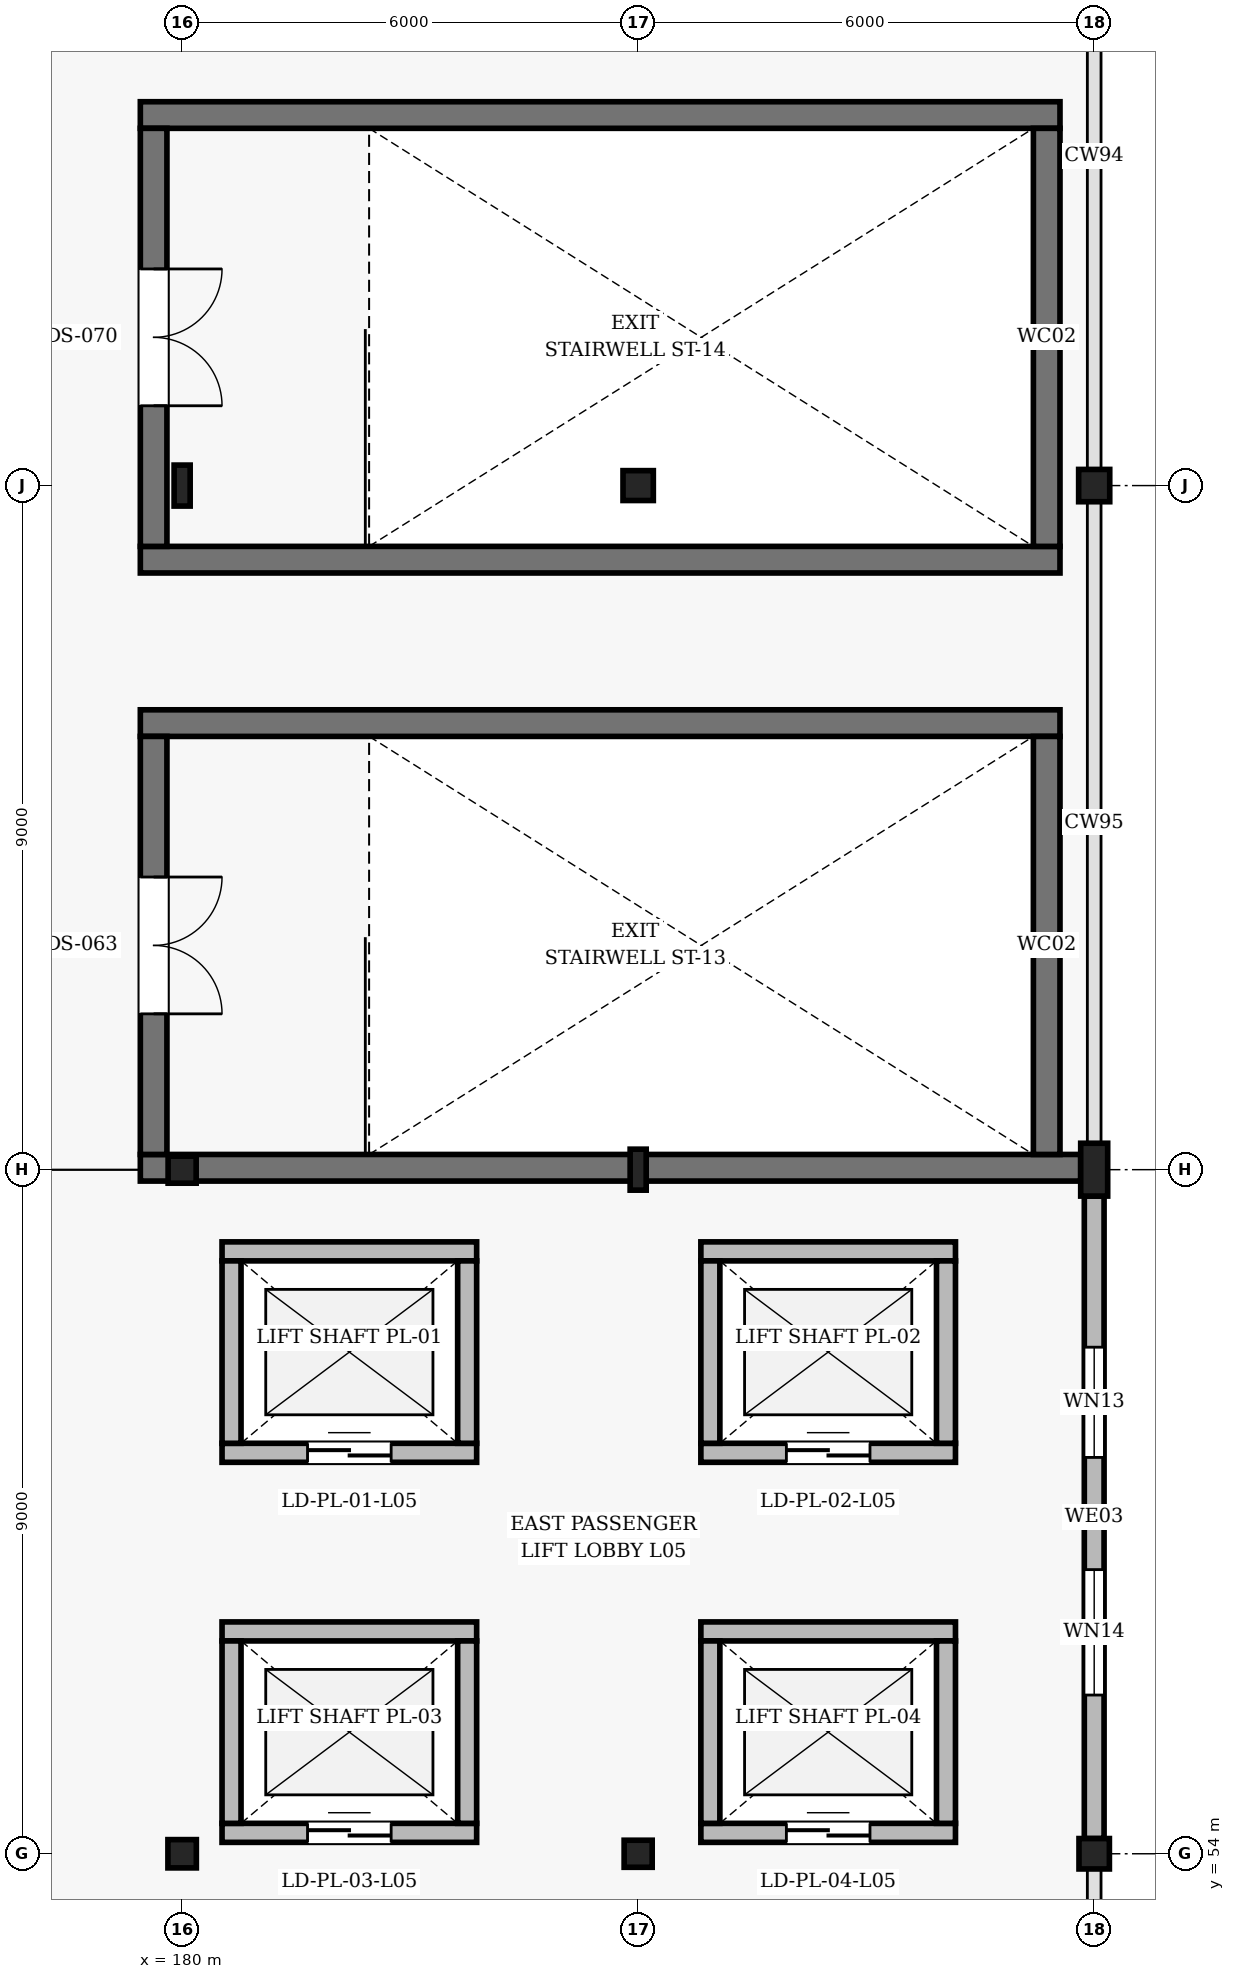
"""IFC4 building model, lengths in metres.
Left out: names, types, materials, properties, quantities, classifications, styles, units other than length and angle.
Written with IfcOpenShell. Run it as: python <this file> out.ifc"""

import sys

from ifc_helpers import new_model, si_unit, direction, frame, frame_2d, origin, origin_2d, place, context, subcontext, project, spatial, rectangle, hollow_rectangle, i_section, extrude, element, fill, save


model = new_model("IFC4")
c1 = context("Model", 3, precision=1e-05, world=origin(), true_north=direction((0.0, 1.0)))
c2 = subcontext(c1, "Body", "Model", "MODEL_VIEW")
j1 = project(units=[si_unit("LENGTHUNIT", "METRE"), si_unit("PLANEANGLEUNIT", "RADIAN")], contexts=[c1])
p1 = place(None, origin())
s1 = spatial("IfcSite", under=j1, at=p1, CompositionType="ELEMENT")
p2 = place(p1, origin())
s2 = spatial("IfcBuilding", under=s1, at=p2, CompositionType="ELEMENT")
p3 = place(p2, frame((0.0, 0.0, 25.2)))
s3 = spatial("IfcBuildingStorey", under=s2, at=p3, CompositionType="ELEMENT", Elevation=25.2)
p4 = place(p3, frame((180.0, 54.0, 0.0), z_axis=(0.0, 0.0, 1.0), x_axis=(1.0, 0.0, 0.0)))
e1 = element("IfcColumn", 1, at=p4, inside=s3, PredefinedType="COLUMN", context=c2, shape_type="SweptSolid", body=[
    extrude(i_section(OverallWidth=0.374, OverallDepth=0.372, WebThickness=0.016, FlangeThickness=0.026, FilletRadius=0.016, at=origin_2d()), origin(), (0.0, 0.0, 1.0), 4.8),
])
p5 = place(p3, frame((180.0, 63.0, 0.0), z_axis=(0.0, 0.0, 1.0), x_axis=(1.0, 0.0, 0.0)))
e2 = element("IfcColumn", 2, at=p5, inside=s3, PredefinedType="COLUMN", context=c2, shape_type="SweptSolid", body=[
    extrude(i_section(OverallWidth=0.369, OverallDepth=0.356, WebThickness=0.011, FlangeThickness=0.018, FilletRadius=0.015, at=origin_2d()), origin(), (0.0, 0.0, 1.0), 4.595),
])
p6 = place(p3, frame((180.0, 72.0, 0.0), z_axis=(0.0, 0.0, 1.0), x_axis=(1.0, 0.0, 0.0)))
e3 = element("IfcColumn", 3, at=p6, inside=s3, PredefinedType="COLUMN", context=c2, shape_type="SweptSolid", body=[
    extrude(i_section(OverallWidth=0.211, OverallDepth=0.539, WebThickness=0.012, FlangeThickness=0.019, FilletRadius=0.014, at=origin_2d()), origin(), (0.0, 0.0, 1.0), 4.595),
])
p7 = place(p3, frame((186.0, 54.0, 0.0), z_axis=(0.0, 0.0, 1.0), x_axis=(1.0, 0.0, 0.0)))
e4 = element("IfcColumn", 4, at=p7, inside=s3, PredefinedType="COLUMN", context=c2, shape_type="SweptSolid", body=[
    extrude(i_section(OverallWidth=0.369, OverallDepth=0.356, WebThickness=0.011, FlangeThickness=0.018, FilletRadius=0.015, at=origin_2d()), origin(), (0.0, 0.0, 1.0), 4.8),
])
p8 = place(p3, frame((186.0, 63.0, 0.0), z_axis=(0.0, 0.0, 1.0), x_axis=(1.0, 0.0, 0.0)))
e5 = element("IfcColumn", 5, at=p8, inside=s3, PredefinedType="COLUMN", context=c2, shape_type="SweptSolid", body=[
    extrude(i_section(OverallWidth=0.211, OverallDepth=0.539, WebThickness=0.012, FlangeThickness=0.019, FilletRadius=0.014, at=origin_2d()), origin(), (0.0, 0.0, 1.0), 4.595),
])
p9 = place(p3, frame((186.0, 72.0, 0.0), z_axis=(0.0, 0.0, 1.0), x_axis=(1.0, 0.0, 0.0)))
e6 = element("IfcColumn", 6, at=p9, inside=s3, PredefinedType="COLUMN", context=c2, shape_type="SweptSolid", body=[
    extrude(i_section(OverallWidth=0.399, OverallDepth=0.393, WebThickness=0.023, FlangeThickness=0.037, FilletRadius=0.018, at=origin_2d()), origin(), (0.0, 0.0, 1.0), 4.595),
])
p10 = place(p3, frame((192.0, 54.0, 0.0), z_axis=(0.0, 0.0, 1.0), x_axis=(1.0, 0.0, 0.0)))
e7 = element("IfcColumn", 7, at=p10, inside=s3, PredefinedType="COLUMN", context=c2, shape_type="SweptSolid", body=[
    extrude(hollow_rectangle(XDim=0.4, YDim=0.4, WallThickness=0.016, InnerFilletRadius=0.016, OuterFilletRadius=0.032, at=origin_2d()), origin(), (0.0, 0.0, 1.0), 4.8),
])
p11 = place(p3, frame((192.0, 63.0, 0.0), z_axis=(0.0, 0.0, 1.0), x_axis=(1.0, 0.0, 0.0)))
e8 = element("IfcColumn", 8, at=p11, inside=s3, PredefinedType="COLUMN", context=c2, shape_type="SweptSolid", body=[
    extrude(i_section(OverallWidth=0.355, OverallDepth=0.695, WebThickness=0.015, FlangeThickness=0.025, FilletRadius=0.018, at=origin_2d()), origin(), (0.0, 0.0, 1.0), 4.595),
])
p12 = place(p3, frame((192.0, 72.0, 0.0), z_axis=(0.0, 0.0, 1.0), x_axis=(1.0, 0.0, 0.0)))
e9 = element("IfcColumn", 9, at=p12, inside=s3, PredefinedType="COLUMN", context=c2, shape_type="SweptSolid", body=[
    extrude(i_section(OverallWidth=0.409, OverallDepth=0.425, WebThickness=0.031, FlangeThickness=0.049, FilletRadius=0.02, at=origin_2d()), origin(), (0.0, 0.0, 1.0), 4.595),
])
p13 = place(p3, frame((192.0, 62.653, 0.0), z_axis=(0.0, 0.0, 1.0), x_axis=(0.0, -1.0, 0.0)))
e10 = element("IfcWall", 10, at=p13, inside=s3, PredefinedType="SOLIDWALL", context=c2, shape_type="SweptSolid", body=[
    extrude(rectangle(XDim=8.453, YDim=0.26, at=frame_2d((4.226, 0.0))), origin(), (0.0, 0.0, 1.0), 4.485),
])
p14 = place(p13, frame((1.988, 0.0, 0.95)))
e11 = element("IfcOpeningElement", 11, at=p14, cuts=e10, PredefinedType="OPENING", context=c2, shape_type="SweptSolid", body=[
    extrude(rectangle(XDim=1.45, YDim=2.05, at=frame_2d((0.725, 1.025))), frame((0.0, 0.14, 0.0), z_axis=(0.0, -1.0, 0.0), x_axis=(1.0, 0.0, 0.0)), (0.0, 0.0, 1.0), 0.28),
])
p15 = place(p13, frame((4.914, 0.0, 0.95)))
e12 = element("IfcOpeningElement", 12, at=p15, cuts=e10, PredefinedType="OPENING", context=c2, shape_type="SweptSolid", body=[
    extrude(rectangle(XDim=1.65, YDim=2.05, at=frame_2d((0.825, 1.025))), frame((0.0, 0.14, 0.0), z_axis=(0.0, -1.0, 0.0), x_axis=(1.0, 0.0, 0.0)), (0.0, 0.0, 1.0), 0.28),
])
p16 = place(p3, frame((179.45, 63.025, 0.0), z_axis=(0.0, 0.0, 1.0), x_axis=(1.0, 0.0, 0.0)))
e13 = element("IfcWall", 13, at=p16, inside=s3, PredefinedType="SHEAR", context=c2, shape_type="SweptSolid", body=[
    extrude(rectangle(XDim=12.373, YDim=0.35, at=frame_2d((6.186, 0.0))), origin(), (0.0, 0.0, 1.0), 4.595),
])
p17 = place(p3, frame((191.55, 68.875, 0.0), z_axis=(0.0, 0.0, 1.0), x_axis=(-1.0, 0.0, 0.0)))
e14 = element("IfcWall", 14, at=p17, inside=s3, PredefinedType="SHEAR", context=c2, shape_type="SweptSolid", body=[
    extrude(rectangle(XDim=12.1, YDim=0.35, at=frame_2d((6.05, 0.0))), origin(), (0.0, 0.0, 1.0), 4.595),
])
p18 = place(p3, frame((179.625, 68.7, 0.0), z_axis=(0.0, 0.0, 1.0), x_axis=(0.0, -1.0, 0.0)))
e15 = element("IfcWall", 15, at=p18, inside=s3, PredefinedType="SHEAR", context=c2, shape_type="SweptSolid", body=[
    extrude(rectangle(XDim=5.5, YDim=0.35, at=frame_2d((2.75, 0.0))), origin(), (0.0, 0.0, 1.0), 4.595),
])
p19 = place(p18, frame((1.85, 0.0, 0.0)))
e16 = element("IfcOpeningElement", 16, at=p19, cuts=e15, PredefinedType="OPENING", context=c2, shape_type="SweptSolid", body=[
    extrude(rectangle(XDim=1.8, YDim=2.2, at=frame_2d((0.9, 1.1))), frame((0.0, 0.185, 0.0), z_axis=(0.0, -1.0, 0.0), x_axis=(1.0, 0.0, 0.0)), (0.0, 0.0, 1.0), 0.37),
])
p20 = place(p3, frame((191.375, 63.2, 0.0), z_axis=(0.0, 0.0, 1.0), x_axis=(0.0, 1.0, 0.0)))
e17 = element("IfcWall", 17, at=p20, inside=s3, PredefinedType="SHEAR", context=c2, shape_type="SweptSolid", body=[
    extrude(rectangle(XDim=5.5, YDim=0.35, at=frame_2d((2.75, 0.0))), origin(), (0.0, 0.0, 1.0), 4.595),
])
for number, where, z_axis, x_axis in (
    (18, (179.45, 71.025, 0.0), (0.0, 0.0, 1.0), (1.0, 0.0, 0.0)),
    (19, (191.55, 76.875, 0.0), (0.0, 0.0, 1.0), (-1.0, 0.0, 0.0)),
):
    element("IfcWall", number, at=place(p3, frame(where, z_axis=z_axis, x_axis=x_axis)), inside=s3, PredefinedType="SHEAR", context=c2, shape_type="SweptSolid", body=[
        extrude(rectangle(XDim=12.1, YDim=0.35, at=frame_2d((6.05, 0.0))), origin(), (0.0, 0.0, 1.0), 4.595),
    ])
p21 = place(p3, frame((179.625, 76.7, 0.0), z_axis=(0.0, 0.0, 1.0), x_axis=(0.0, -1.0, 0.0)))
e20 = element("IfcWall", 20, at=p21, inside=s3, PredefinedType="SHEAR", context=c2, shape_type="SweptSolid", body=[
    extrude(rectangle(XDim=5.5, YDim=0.35, at=frame_2d((2.75, 0.0))), origin(), (0.0, 0.0, 1.0), 4.595),
])
p22 = place(p21, frame((1.85, 0.0, 0.0)))
e21 = element("IfcOpeningElement", 21, at=p22, cuts=e20, PredefinedType="OPENING", context=c2, shape_type="SweptSolid", body=[
    extrude(rectangle(XDim=1.8, YDim=2.2, at=frame_2d((0.9, 1.1))), frame((0.0, 0.185, 0.0), z_axis=(0.0, -1.0, 0.0), x_axis=(1.0, 0.0, 0.0)), (0.0, 0.0, 1.0), 0.37),
])
p23 = place(p3, frame((191.375, 71.2, 0.0), z_axis=(0.0, 0.0, 1.0), x_axis=(0.0, 1.0, 0.0)))
e22 = element("IfcWall", 22, at=p23, inside=s3, PredefinedType="SHEAR", context=c2, shape_type="SweptSolid", body=[
    extrude(rectangle(XDim=5.5, YDim=0.35, at=frame_2d((2.75, 0.0))), origin(), (0.0, 0.0, 1.0), 4.595),
])
p24 = place(p3, frame((180.525, 59.275, 0.0), z_axis=(0.0, 0.0, 1.0), x_axis=(1.0, 0.0, 0.0)))
e23 = element("IfcWall", 23, at=p24, inside=s3, PredefinedType="SOLIDWALL", context=c2, shape_type="SweptSolid", body=[
    extrude(rectangle(XDim=3.35, YDim=0.25, at=frame_2d((1.675, 0.0))), origin(), (0.0, 0.0, 1.0), 4.6),
])
p25 = place(p24, frame((1.125, 0.0, 0.0)))
e24 = element("IfcOpeningElement", 24, at=p25, cuts=e23, PredefinedType="OPENING", context=c2, shape_type="SweptSolid", body=[
    extrude(rectangle(XDim=1.1, YDim=2.2, at=frame_2d((0.55, 1.1))), frame((0.0, 0.135, 0.0), z_axis=(0.0, -1.0, 0.0), x_axis=(1.0, 0.0, 0.0)), (0.0, 0.0, 1.0), 0.27),
])
p26 = place(p3, frame((183.875, 61.925, 0.0), z_axis=(0.0, 0.0, 1.0), x_axis=(-1.0, 0.0, 0.0)))
e25 = element("IfcWall", 25, at=p26, inside=s3, PredefinedType="SOLIDWALL", context=c2, shape_type="SweptSolid", body=[
    extrude(rectangle(XDim=3.35, YDim=0.25, at=frame_2d((1.675, 0.0))), origin(), (0.0, 0.0, 1.0), 4.6),
])
for number, where, z_axis, x_axis in (
    (26, (180.65, 61.8, 0.0), (0.0, 0.0, 1.0), (0.0, -1.0, 0.0)),
    (27, (183.75, 59.4, 0.0), (0.0, 0.0, 1.0), (0.0, 1.0, 0.0)),
):
    element("IfcWall", number, at=place(p3, frame(where, z_axis=z_axis, x_axis=x_axis)), inside=s3, PredefinedType="SOLIDWALL", context=c2, shape_type="SweptSolid", body=[
        extrude(rectangle(XDim=2.4, YDim=0.25, at=frame_2d((1.2, 0.0))), origin(), (0.0, 0.0, 1.0), 4.6),
    ])
p27 = place(p3, frame((186.825, 59.275, 0.0), z_axis=(0.0, 0.0, 1.0), x_axis=(1.0, 0.0, 0.0)))
e28 = element("IfcWall", 28, at=p27, inside=s3, PredefinedType="SOLIDWALL", context=c2, shape_type="SweptSolid", body=[
    extrude(rectangle(XDim=3.35, YDim=0.25, at=frame_2d((1.675, 0.0))), origin(), (0.0, 0.0, 1.0), 4.6),
])
p28 = place(p27, frame((1.125, 0.0, 0.0)))
e29 = element("IfcOpeningElement", 29, at=p28, cuts=e28, PredefinedType="OPENING", context=c2, shape_type="SweptSolid", body=[
    extrude(rectangle(XDim=1.1, YDim=2.2, at=frame_2d((0.55, 1.1))), frame((0.0, 0.135, 0.0), z_axis=(0.0, -1.0, 0.0), x_axis=(1.0, 0.0, 0.0)), (0.0, 0.0, 1.0), 0.27),
])
p29 = place(p3, frame((190.175, 61.925, 0.0), z_axis=(0.0, 0.0, 1.0), x_axis=(-1.0, 0.0, 0.0)))
e30 = element("IfcWall", 30, at=p29, inside=s3, PredefinedType="SOLIDWALL", context=c2, shape_type="SweptSolid", body=[
    extrude(rectangle(XDim=3.35, YDim=0.25, at=frame_2d((1.675, 0.0))), origin(), (0.0, 0.0, 1.0), 4.6),
])
for number, where, z_axis, x_axis in (
    (31, (186.95, 61.8, 0.0), (0.0, 0.0, 1.0), (0.0, -1.0, 0.0)),
    (32, (190.05, 59.4, 0.0), (0.0, 0.0, 1.0), (0.0, 1.0, 0.0)),
):
    element("IfcWall", number, at=place(p3, frame(where, z_axis=z_axis, x_axis=x_axis)), inside=s3, PredefinedType="SOLIDWALL", context=c2, shape_type="SweptSolid", body=[
        extrude(rectangle(XDim=2.4, YDim=0.25, at=frame_2d((1.2, 0.0))), origin(), (0.0, 0.0, 1.0), 4.6),
    ])
p30 = place(p3, frame((180.525, 54.275, 0.0), z_axis=(0.0, 0.0, 1.0), x_axis=(1.0, 0.0, 0.0)))
e33 = element("IfcWall", 33, at=p30, inside=s3, PredefinedType="SOLIDWALL", context=c2, shape_type="SweptSolid", body=[
    extrude(rectangle(XDim=3.35, YDim=0.25, at=frame_2d((1.675, 0.0))), origin(), (0.0, 0.0, 1.0), 3.794),
])
p31 = place(p30, frame((1.125, 0.0, 0.0)))
e34 = element("IfcOpeningElement", 34, at=p31, cuts=e33, PredefinedType="OPENING", context=c2, shape_type="SweptSolid", body=[
    extrude(rectangle(XDim=1.1, YDim=2.2, at=frame_2d((0.55, 1.1))), frame((0.0, 0.135, 0.0), z_axis=(0.0, -1.0, 0.0), x_axis=(1.0, 0.0, 0.0)), (0.0, 0.0, 1.0), 0.27),
])
p32 = place(p3, frame((183.875, 56.925, 0.0), z_axis=(0.0, 0.0, 1.0), x_axis=(-1.0, 0.0, 0.0)))
e35 = element("IfcWall", 35, at=p32, inside=s3, PredefinedType="SOLIDWALL", context=c2, shape_type="SweptSolid", body=[
    extrude(rectangle(XDim=3.35, YDim=0.25, at=frame_2d((1.675, 0.0))), origin(), (0.0, 0.0, 1.0), 4.6),
])
for number, where, z_axis, x_axis in (
    (36, (180.65, 56.8, 0.0), (0.0, 0.0, 1.0), (0.0, -1.0, 0.0)),
    (37, (183.75, 54.4, 0.0), (0.0, 0.0, 1.0), (0.0, 1.0, 0.0)),
):
    element("IfcWall", number, at=place(p3, frame(where, z_axis=z_axis, x_axis=x_axis)), inside=s3, PredefinedType="SOLIDWALL", context=c2, shape_type="SweptSolid", body=[
        extrude(rectangle(XDim=2.4, YDim=0.25, at=frame_2d((1.2, 0.0))), origin(), (0.0, 0.0, 1.0), 3.794),
    ])
p33 = place(p3, frame((186.825, 54.275, 0.0), z_axis=(0.0, 0.0, 1.0), x_axis=(1.0, 0.0, 0.0)))
e38 = element("IfcWall", 38, at=p33, inside=s3, PredefinedType="SOLIDWALL", context=c2, shape_type="SweptSolid", body=[
    extrude(rectangle(XDim=3.35, YDim=0.25, at=frame_2d((1.675, 0.0))), origin(), (0.0, 0.0, 1.0), 3.794),
])
p34 = place(p33, frame((1.125, 0.0, 0.0)))
e39 = element("IfcOpeningElement", 39, at=p34, cuts=e38, PredefinedType="OPENING", context=c2, shape_type="SweptSolid", body=[
    extrude(rectangle(XDim=1.1, YDim=2.2, at=frame_2d((0.55, 1.1))), frame((0.0, 0.135, 0.0), z_axis=(0.0, -1.0, 0.0), x_axis=(1.0, 0.0, 0.0)), (0.0, 0.0, 1.0), 0.27),
])
p35 = place(p3, frame((190.175, 56.925, 0.0), z_axis=(0.0, 0.0, 1.0), x_axis=(-1.0, 0.0, 0.0)))
e40 = element("IfcWall", 40, at=p35, inside=s3, PredefinedType="SOLIDWALL", context=c2, shape_type="SweptSolid", body=[
    extrude(rectangle(XDim=3.35, YDim=0.25, at=frame_2d((1.675, 0.0))), origin(), (0.0, 0.0, 1.0), 4.6),
])
for number, where, z_axis, x_axis in (
    (41, (186.95, 56.8, 0.0), (0.0, 0.0, 1.0), (0.0, -1.0, 0.0)),
    (42, (190.05, 54.4, 0.0), (0.0, 0.0, 1.0), (0.0, 1.0, 0.0)),
):
    element("IfcWall", number, at=place(p3, frame(where, z_axis=z_axis, x_axis=x_axis)), inside=s3, PredefinedType="SOLIDWALL", context=c2, shape_type="SweptSolid", body=[
        extrude(rectangle(XDim=2.4, YDim=0.25, at=frame_2d((1.2, 0.0))), origin(), (0.0, 0.0, 1.0), 3.794),
    ])
p36 = place(p14, origin())
e43 = element("IfcWindow", 43, at=p36, inside=s3, PartitioningType="SINGLE_PANEL", PredefinedType="WINDOW", context=c2, shape_type="SweptSolid", body=[
    extrude(rectangle(XDim=1.45, YDim=2.05, at=frame_2d((0.725, 1.025))), frame((0.0, 0.03, 0.0), z_axis=(0.0, -1.0, 0.0), x_axis=(1.0, 0.0, 0.0)), (0.0, 0.0, 1.0), 0.06),
])
fill(e11, e43)
p37 = place(p15, origin())
e44 = element("IfcWindow", 44, at=p37, inside=s3, PartitioningType="SINGLE_PANEL", PredefinedType="WINDOW", context=c2, shape_type="SweptSolid", body=[
    extrude(rectangle(XDim=1.65, YDim=2.05, at=frame_2d((0.825, 1.025))), frame((0.0, 0.03, 0.0), z_axis=(0.0, -1.0, 0.0), x_axis=(1.0, 0.0, 0.0)), (0.0, 0.0, 1.0), 0.06),
])
fill(e12, e44)
p38 = place(p19, origin())
e45 = element("IfcDoor", 45, at=p38, inside=s3, OperationType="DOUBLE_DOOR_SINGLE_SWING", PredefinedType="DOOR", context=c2, shape_type="SweptSolid", body=[
    extrude(rectangle(XDim=1.8, YDim=2.2, at=frame_2d((0.9, 1.1))), frame((0.0, 0.025, 0.0), z_axis=(0.0, -1.0, 0.0), x_axis=(1.0, 0.0, 0.0)), (0.0, 0.0, 1.0), 0.05),
])
fill(e16, e45)
p39 = place(p22, origin())
e46 = element("IfcDoor", 46, at=p39, inside=s3, OperationType="DOUBLE_DOOR_SINGLE_SWING", PredefinedType="DOOR", context=c2, shape_type="SweptSolid", body=[
    extrude(rectangle(XDim=1.8, YDim=2.2, at=frame_2d((0.9, 1.1))), frame((0.0, 0.025, 0.0), z_axis=(0.0, -1.0, 0.0), x_axis=(1.0, 0.0, 0.0)), (0.0, 0.0, 1.0), 0.05),
])
fill(e21, e46)
p40 = place(p25, origin())
e47 = element("IfcDoor", 47, at=p40, inside=s3, OperationType="DOUBLE_DOOR_SLIDING", PredefinedType="DOOR", context=c2, shape_type="SweptSolid", body=[
    extrude(rectangle(XDim=1.1, YDim=2.2, at=frame_2d((0.55, 1.1))), frame((0.0, 0.025, 0.0), z_axis=(0.0, -1.0, 0.0), x_axis=(1.0, 0.0, 0.0)), (0.0, 0.0, 1.0), 0.05),
])
fill(e24, e47)
p41 = place(p28, origin())
e48 = element("IfcDoor", 48, at=p41, inside=s3, OperationType="DOUBLE_DOOR_SLIDING", PredefinedType="DOOR", context=c2, shape_type="SweptSolid", body=[
    extrude(rectangle(XDim=1.1, YDim=2.2, at=frame_2d((0.55, 1.1))), frame((0.0, 0.025, 0.0), z_axis=(0.0, -1.0, 0.0), x_axis=(1.0, 0.0, 0.0)), (0.0, 0.0, 1.0), 0.05),
])
fill(e29, e48)
p42 = place(p31, origin())
e49 = element("IfcDoor", 49, at=p42, inside=s3, OperationType="DOUBLE_DOOR_SLIDING", PredefinedType="DOOR", context=c2, shape_type="SweptSolid", body=[
    extrude(rectangle(XDim=1.1, YDim=2.2, at=frame_2d((0.55, 1.1))), frame((0.0, 0.025, 0.0), z_axis=(0.0, -1.0, 0.0), x_axis=(1.0, 0.0, 0.0)), (0.0, 0.0, 1.0), 0.05),
])
fill(e34, e49)
p43 = place(p34, origin())
e50 = element("IfcDoor", 50, at=p43, inside=s3, OperationType="DOUBLE_DOOR_SLIDING", PredefinedType="DOOR", context=c2, shape_type="SweptSolid", body=[
    extrude(rectangle(XDim=1.1, YDim=2.2, at=frame_2d((0.55, 1.1))), frame((0.0, 0.025, 0.0), z_axis=(0.0, -1.0, 0.0), x_axis=(1.0, 0.0, 0.0)), (0.0, 0.0, 1.0), 0.05),
])
fill(e39, e50)
save(model, sys.argv[1])
